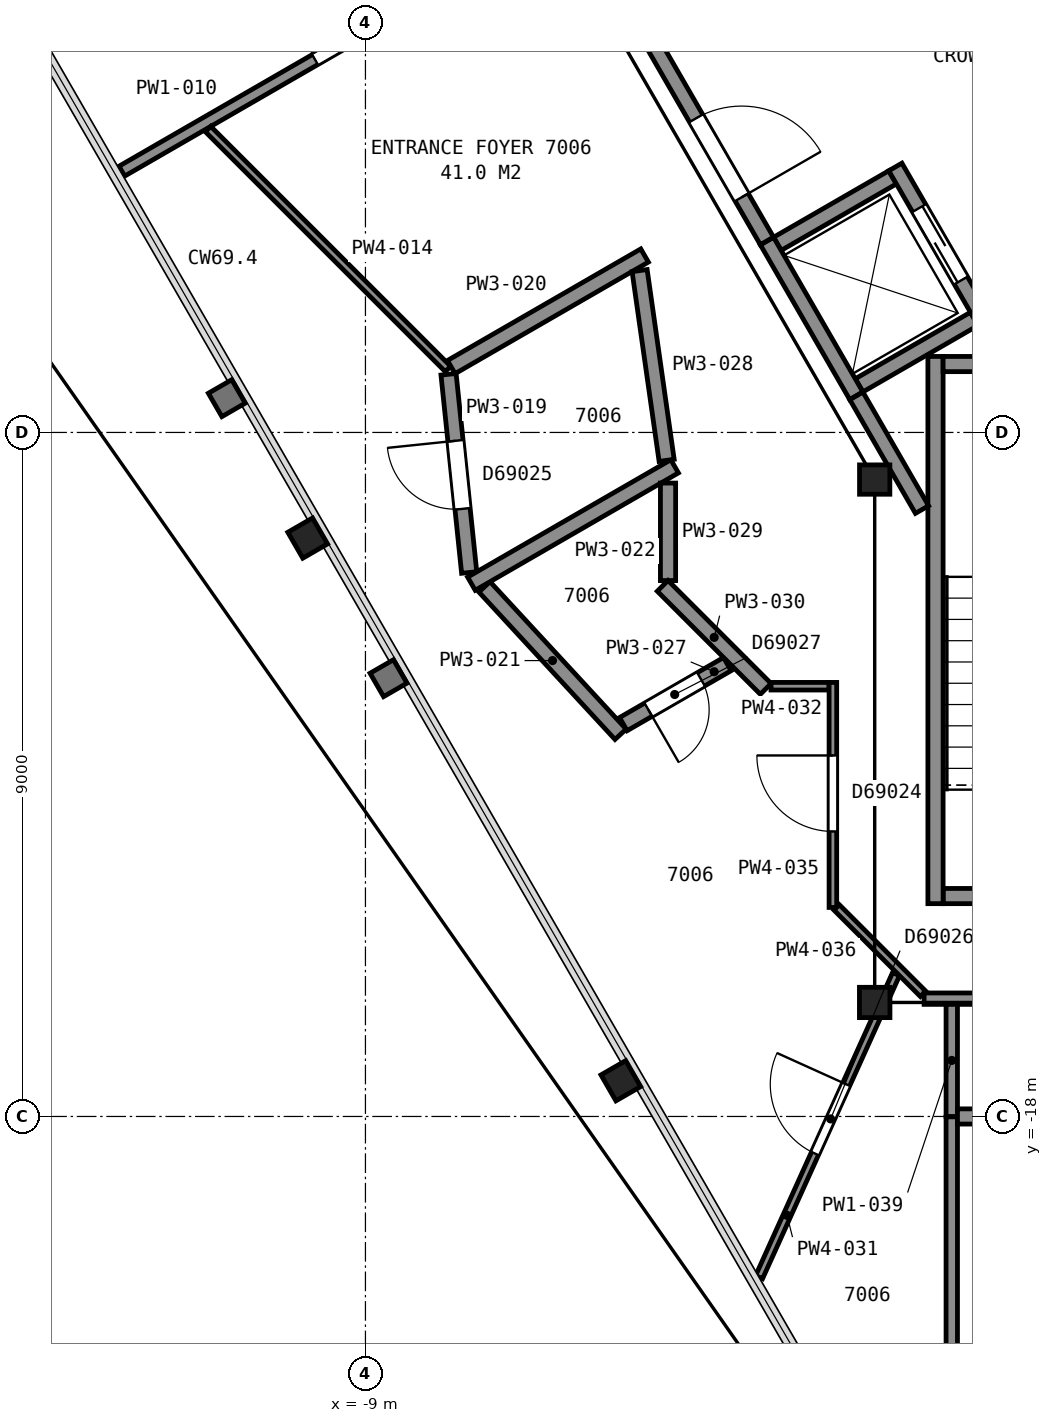
"""IFC4 building model, lengths in metres.
Left out: names, types, materials, properties, quantities, classifications, styles, units other than length and angle.
Written with IfcOpenShell. Run it as: python <this file> out.ifc"""

import sys

from ifc_helpers import new_model, si_unit, direction, frame, frame_2d, origin, origin_2d, place, context, subcontext, project, spatial, rectangle, i_section, extrude, element, fill, save


model = new_model("IFC4")
c1 = context("Model", 3, precision=1e-05, world=origin(), true_north=direction((0.0, 1.0)))
c2 = subcontext(c1, "Body", "Model", "MODEL_VIEW")
j1 = project(units=[si_unit("LENGTHUNIT", "METRE"), si_unit("PLANEANGLEUNIT", "RADIAN")], contexts=[c1])
p1 = place(None, origin())
s1 = spatial("IfcSite", under=j1, at=p1, CompositionType="ELEMENT")
p2 = place(p1, origin())
s2 = spatial("IfcBuilding", under=s1, at=p2, CompositionType="ELEMENT")
p3 = place(p2, frame((0.0, 0.0, 278.8)))
s3 = spatial("IfcBuildingStorey", under=s2, at=p3, CompositionType="ELEMENT", Elevation=278.8)
for number, where, z_axis, x_axis in (
    (1, (-9.76, -10.39, 0.0), (0.0, 0.0, 1.0), (-0.5, 0.866, 0.0)),
    (2, (-5.64, -17.53, 0.0), (0.0, 0.0, 1.0), (-0.5, 0.866, 0.0)),
):
    element("IfcColumn", number, at=place(p3, frame(where, z_axis=z_axis, x_axis=x_axis)), inside=s3, PredefinedType="COLUMN", context=c2, shape_type="SweptSolid", body=[
        extrude(i_section(OverallWidth=0.394, OverallDepth=0.376, WebThickness=0.017, FlangeThickness=0.028, FilletRadius=0.015, at=origin_2d()), origin(), (0.0, 0.0, 1.0), 3.7),
    ])
p4 = place(p3, frame((-2.3, -9.62, 0.0), z_axis=(0.0, 0.0, 1.0), x_axis=(1.0, 0.0, 0.0)))
e3 = element("IfcColumn", 3, at=p4, inside=s3, PredefinedType="COLUMN", context=c2, shape_type="SweptSolid", body=[
    extrude(i_section(OverallWidth=0.399, OverallDepth=0.386, WebThickness=0.021, FlangeThickness=0.033, FilletRadius=0.015, at=origin_2d()), origin(), (0.0, 0.0, 1.0), 3.7),
])
p5 = place(p3, frame((-2.3, -16.5, 0.0), z_axis=(0.0, 0.0, 1.0), x_axis=(-1.0, 0.0, 0.0)))
e4 = element("IfcColumn", 4, at=p5, inside=s3, PredefinedType="COLUMN", context=c2, shape_type="SweptSolid", body=[
    extrude(i_section(OverallWidth=0.401, OverallDepth=0.399, WebThickness=0.025, FlangeThickness=0.04, FilletRadius=0.015, at=origin_2d()), origin(), (0.0, 0.0, 1.0), 3.7),
])
p6 = place(p3, frame((-1.4, -15.1, 0.0), z_axis=(0.0, 0.0, 1.0), x_axis=(1.0, 0.0, 0.0)))
e5 = element("IfcWall", 5, at=p6, inside=s3, PredefinedType="PARTITIONING", context=c2, shape_type="SweptSolid", body=[
    extrude(rectangle(XDim=2.8, YDim=0.2, at=frame_2d((1.4, 0.0))), origin(), (0.0, 0.0, 1.0), 3.45),
])
p7 = place(p6, frame((0.85, 0.0, 0.0)))
e6 = element("IfcOpeningElement", 6, at=p7, cuts=e5, PredefinedType="OPENING", context=c2, shape_type="SweptSolid", body=[
    extrude(rectangle(XDim=1.1, YDim=2.1, at=frame_2d((0.55, 1.05))), frame((0.0, 0.11, 0.0), z_axis=(0.0, -1.0, 0.0), x_axis=(1.0, 0.0, 0.0)), (0.0, 0.0, 1.0), 0.22),
])
p8 = place(p3, frame((-1.5, -8.0, 0.0), z_axis=(0.0, 0.0, 1.0), x_axis=(0.0, -1.0, 0.0)))
e7 = element("IfcWall", 7, at=p8, inside=s3, PredefinedType="PARTITIONING", context=c2, shape_type="SweptSolid", body=[
    extrude(rectangle(XDim=7.2, YDim=0.2, at=frame_2d((3.6, 0.0))), origin(), (0.0, 0.0, 1.0), 3.45),
])
p9 = place(p3, frame((-1.4, -8.1, 0.0), z_axis=(0.0, 0.0, 1.0), x_axis=(1.0, 0.0, 0.0)))
e8 = element("IfcWall", 8, at=p9, inside=s3, PredefinedType="PARTITIONING", context=c2, shape_type="SweptSolid", body=[
    extrude(rectangle(XDim=2.8, YDim=0.2, at=frame_2d((1.4, 0.0))), origin(), (0.0, 0.0, 1.0), 3.45),
])
for number, where, z_axis, x_axis in (
    (9, (-2.505, -8.38, 0.0), (0.0, 0.0, 1.0), (0.866, 0.5, 0.0)),
    (10, (-3.58, -6.519, 0.0), (0.0, 0.0, 1.0), (0.866, 0.5, 0.0)),
):
    element("IfcWall", number, at=place(p3, frame(where, z_axis=z_axis, x_axis=x_axis)), inside=s3, PredefinedType="PARTITIONING", context=c2, shape_type="SweptSolid", body=[
        extrude(rectangle(XDim=1.75, YDim=0.2, at=frame_2d((0.875, 0.0))), origin(), (0.0, 0.0, 1.0), 3.7),
    ])
p10 = place(p3, frame((-0.853, -7.542, 0.0), z_axis=(0.0, 0.0, 1.0), x_axis=(-0.500016218704, 0.866016039709, 0.0)))
e11 = element("IfcWall", 11, at=p10, inside=s3, PredefinedType="PARTITIONING", context=c2, shape_type="SweptSolid", body=[
    extrude(rectangle(XDim=2.35, YDim=0.2, at=frame_2d((1.175, 0.0))), origin(), (0.0, 0.0, 1.0), 3.7),
])
p11 = place(p10, frame((0.625, 0.0, 0.0)))
e12 = element("IfcOpeningElement", 12, at=p11, cuts=e11, PredefinedType="OPENING", context=c2, shape_type="SweptSolid", body=[
    extrude(rectangle(XDim=1.1, YDim=2.1, at=frame_2d((0.55, 1.05))), frame((0.0, 0.11, 0.0), z_axis=(0.0, -1.0, 0.0), x_axis=(1.0, 0.0, 0.0)), (0.0, 0.0, 1.0), 0.22),
])
p12 = place(p3, frame((-2.542, -8.517, 0.0), z_axis=(0.0, 0.0, 1.0), x_axis=(-0.500016218704, 0.866016039709, 0.0)))
e13 = element("IfcWall", 13, at=p12, inside=s3, PredefinedType="PARTITIONING", context=c2, shape_type="SweptSolid", body=[
    extrude(rectangle(XDim=2.35, YDim=0.2, at=frame_2d((1.175, 0.0))), origin(), (0.0, 0.0, 1.0), 3.7),
])
p13 = place(p3, frame((-7.141, -0.551, 0.0), z_axis=(0.0, 0.0, 1.0), x_axis=(0.500001302854, -0.86602465158, 0.0)))
e14 = element("IfcWall", 14, at=p13, inside=s3, PredefinedType="PARTITIONING", context=c2, shape_type="SweptSolid", body=[
    extrude(rectangle(XDim=6.846, YDim=0.2, at=frame_2d((3.423, 0.0))), origin(), (0.0, 0.0, 1.0), 3.45),
])
p14 = place(p13, frame((4.983, 0.0, 0.0)))
e15 = element("IfcOpeningElement", 15, at=p14, cuts=e14, PredefinedType="OPENING", context=c2, shape_type="SweptSolid", body=[
    extrude(rectangle(XDim=1.2, YDim=2.1, at=frame_2d((0.6, 1.05))), frame((0.0, 0.11, 0.0), z_axis=(0.0, -1.0, 0.0), x_axis=(1.0, 0.0, 0.0)), (0.0, 0.0, 1.0), 0.22),
])
p15 = place(p3, frame((-2.541, -8.519, 0.0), z_axis=(0.0, 0.0, 1.0), x_axis=(0.500016142392, -0.86601608377, 0.0)))
e16 = element("IfcWall", 16, at=p15, inside=s3, PredefinedType="PARTITIONING", context=c2, shape_type="SweptSolid", body=[
    extrude(rectangle(XDim=1.727, YDim=0.2, at=frame_2d((0.864, 0.0))), origin(), (0.0, 0.0, 1.0), 3.45),
])
p16 = place(p3, frame((-12.205, -5.562, 0.0), z_axis=(0.0, 0.0, 1.0), x_axis=(0.866006351856, 0.500032997455, 0.0)))
e17 = element("IfcWall", 17, at=p16, inside=s3, PredefinedType="PARTITIONING", context=c2, shape_type="SweptSolid", body=[
    extrude(rectangle(XDim=5.671, YDim=0.15, at=frame_2d((2.835, 0.0))), origin(), (0.0, 0.0, 1.0), 2.723),
])
p17 = place(p16, frame((2.935, 0.0, 0.0)))
e18 = element("IfcOpeningElement", 18, at=p17, cuts=e17, PredefinedType="OPENING", context=c2, shape_type="SweptSolid", body=[
    extrude(rectangle(XDim=1.0, YDim=2.1, at=frame_2d((0.5, 1.05))), frame((0.0, 0.085, 0.0), z_axis=(0.0, -1.0, 0.0), x_axis=(1.0, 0.0, 0.0)), (0.0, 0.0, 1.0), 0.17),
])
p18 = place(p3, frame((-11.071, -5.008, 0.0), z_axis=(0.0, 0.0, 1.0), x_axis=(0.707079435951, -0.707134125365, 0.0)))
e19 = element("IfcWall", 19, at=p18, inside=s3, PredefinedType="PARTITIONING", context=c2, shape_type="SweptSolid", body=[
    extrude(rectangle(XDim=4.464, YDim=0.1, at=frame_2d((2.232, 0.0))), origin(), (0.0, 0.0, 1.0), 2.723),
])
p19 = place(p3, frame((-7.907, -8.235, 0.0), z_axis=(0.0, 0.0, 1.0), x_axis=(0.103623353624, -0.994616609847, 0.0)))
e20 = element("IfcWall", 20, at=p19, inside=s3, PredefinedType="PARTITIONING", context=c2, shape_type="SweptSolid", body=[
    extrude(rectangle(XDim=2.622, YDim=0.2, at=frame_2d((1.311, 0.0))), origin(), (0.0, 0.0, 1.0), 2.723),
])
p20 = place(p19, frame((0.88, 0.0, 0.0)))
e21 = element("IfcOpeningElement", 21, at=p20, cuts=e20, PredefinedType="OPENING", context=c2, shape_type="SweptSolid", body=[
    extrude(rectangle(XDim=0.9, YDim=2.1, at=frame_2d((0.45, 1.05))), frame((0.0, 0.11, 0.0), z_axis=(0.0, -1.0, 0.0), x_axis=(1.0, 0.0, 0.0)), (0.0, 0.0, 1.0), 0.22),
])
p21 = place(p3, frame((-7.871, -8.14, 0.0), z_axis=(0.0, 0.0, 1.0), x_axis=(0.866106676517, 0.49985920507, 0.0)))
e22 = element("IfcWall", 22, at=p21, inside=s3, PredefinedType="PARTITIONING", context=c2, shape_type="SweptSolid", body=[
    extrude(rectangle(XDim=2.936, YDim=0.2, at=frame_2d((1.468, 0.0))), origin(), (0.0, 0.0, 1.0), 2.723),
])
p22 = place(p3, frame((-7.434, -11.032, 0.0), z_axis=(0.0, 0.0, 1.0), x_axis=(0.678387636859, -0.734704167782, 0.0)))
e23 = element("IfcWall", 23, at=p22, inside=s3, PredefinedType="PARTITIONING", context=c2, shape_type="SweptSolid", body=[
    extrude(rectangle(XDim=2.64, YDim=0.2, at=frame_2d((1.32, 0.0))), origin(), (0.0, 0.0, 1.0), 2.723),
])
p23 = place(p3, frame((-7.606, -10.99, 0.0), z_axis=(0.0, 0.0, 1.0), x_axis=(0.865956409518, 0.500119482538, 0.0)))
e24 = element("IfcWall", 24, at=p23, inside=s3, PredefinedType="PARTITIONING", context=c2, shape_type="SweptSolid", body=[
    extrude(rectangle(XDim=3.087, YDim=0.2, at=frame_2d((1.543, 0.0))), origin(), (0.0, 0.0, 1.0), 2.723),
])
p24 = place(p3, frame((-5.607, -12.838, 0.0), z_axis=(0.0, 0.0, 1.0), x_axis=(0.866095534226, 0.499878510834, 0.0)))
e25 = element("IfcWall", 25, at=p24, inside=s3, PredefinedType="PARTITIONING", context=c2, shape_type="SweptSolid", body=[
    extrude(rectangle(XDim=1.58, YDim=0.2, at=frame_2d((0.79, 0.0))), origin(), (0.0, 0.0, 1.0), 2.723),
])
p25 = place(p24, frame((0.38, 0.0, 0.0)))
e26 = element("IfcOpeningElement", 26, at=p25, cuts=e25, PredefinedType="OPENING", context=c2, shape_type="SweptSolid", body=[
    extrude(rectangle(XDim=0.8, YDim=2.1, at=frame_2d((0.4, 1.05))), frame((0.0, 0.11, 0.0), z_axis=(0.0, -1.0, 0.0), x_axis=(1.0, 0.0, 0.0)), (0.0, 0.0, 1.0), 0.22),
])
p26 = place(p3, frame((-5.393, -6.871, 0.0), z_axis=(0.0, 0.0, 1.0), x_axis=(0.140960508483, -0.990015219604, 0.0)))
e27 = element("IfcWall", 27, at=p26, inside=s3, PredefinedType="PARTITIONING", context=c2, shape_type="SweptSolid", body=[
    extrude(rectangle(XDim=2.522, YDim=0.2, at=frame_2d((1.261, 0.0))), origin(), (0.0, 0.0, 1.0), 2.723),
])
p27 = place(p3, frame((-5.019, -10.949, 0.0), z_axis=(0.0, 0.0, 1.0), x_axis=(0.0, 1.0, 0.0)))
e28 = element("IfcWall", 28, at=p27, inside=s3, PredefinedType="PARTITIONING", context=c2, shape_type="SweptSolid", body=[
    extrude(rectangle(XDim=1.283, YDim=0.2, at=frame_2d((0.642, 0.0))), origin(), (0.0, 0.0, 1.0), 2.723),
])
p28 = place(p3, frame((-5.09, -11.018, 0.0), z_axis=(0.0, 0.0, 1.0), x_axis=(0.707106781187, -0.707106781187, 0.0)))
e29 = element("IfcWall", 29, at=p28, inside=s3, PredefinedType="PARTITIONING", context=c2, shape_type="SweptSolid", body=[
    extrude(rectangle(XDim=1.918, YDim=0.2, at=frame_2d((0.959, 0.0))), origin(), (0.0, 0.0, 1.0), 2.723),
])
p29 = place(p3, frame((-2.019, -16.127, 0.0), z_axis=(0.0, 0.0, 1.0), x_axis=(-0.411876718461, -0.911239578151, 0.0)))
e30 = element("IfcWall", 30, at=p29, inside=s3, PredefinedType="PARTITIONING", context=c2, shape_type="SweptSolid", body=[
    extrude(rectangle(XDim=4.376, YDim=0.1, at=frame_2d((2.188, 0.0))), origin(), (0.0, 0.0, 1.0), 2.723),
])
p30 = place(p29, frame((1.591, 0.0, 0.0)))
e31 = element("IfcOpeningElement", 31, at=p30, cuts=e30, PredefinedType="OPENING", context=c2, shape_type="SweptSolid", body=[
    extrude(rectangle(XDim=1.0, YDim=2.1, at=frame_2d((0.5, 1.05))), frame((0.0, 0.06, 0.0), z_axis=(0.0, -1.0, 0.0), x_axis=(1.0, 0.0, 0.0)), (0.0, 0.0, 1.0), 0.12),
])
p31 = place(p3, frame((-3.664, -12.339, 0.0), z_axis=(0.0, 0.0, 1.0), x_axis=(1.0, 0.0, 0.0)))
e32 = element("IfcWall", 32, at=p31, inside=s3, PredefinedType="PARTITIONING", context=c2, shape_type="SweptSolid", body=[
    extrude(rectangle(XDim=0.764, YDim=0.1, at=frame_2d((0.382, 0.0))), origin(), (0.0, 0.0, 1.0), 2.723),
])
p32 = place(p3, frame((-2.85, -15.25, 0.0), z_axis=(0.0, 0.0, 1.0), x_axis=(0.0, 1.0, 0.0)))
e33 = element("IfcWall", 33, at=p32, inside=s3, PredefinedType="PARTITIONING", context=c2, shape_type="SweptSolid", body=[
    extrude(rectangle(XDim=2.961, YDim=0.1, at=frame_2d((1.48, 0.0))), origin(), (0.0, 0.0, 1.0), 2.723),
])
p33 = place(p32, frame((1.0, 0.0, 0.0)))
e34 = element("IfcOpeningElement", 34, at=p33, cuts=e33, PredefinedType="OPENING", context=c2, shape_type="SweptSolid", body=[
    extrude(rectangle(XDim=1.0, YDim=2.1, at=frame_2d((0.5, 1.05))), frame((0.0, 0.06, 0.0), z_axis=(0.0, -1.0, 0.0), x_axis=(1.0, 0.0, 0.0)), (0.0, 0.0, 1.0), 0.12),
])
p34 = place(p3, frame((-2.801, -15.25, 0.0), z_axis=(0.0, 0.0, 1.0), x_axis=(0.707106781187, -0.707106781187, 0.0)))
e35 = element("IfcWall", 35, at=p34, inside=s3, PredefinedType="PARTITIONING", context=c2, shape_type="SweptSolid", body=[
    extrude(rectangle(XDim=1.608, YDim=0.1, at=frame_2d((0.804, 0.0))), origin(), (0.0, 0.0, 1.0), 2.723),
])
p35 = place(p3, frame((-1.65, -16.45, 0.0), z_axis=(0.0, 0.0, 1.0), x_axis=(1.0, 0.0, 0.0)))
e36 = element("IfcWall", 36, at=p35, inside=s3, PredefinedType="PARTITIONING", context=c2, shape_type="SweptSolid", body=[
    extrude(rectangle(XDim=2.625, YDim=0.15, at=frame_2d((1.312, 0.0))), origin(), (0.0, 0.0, 1.0), 2.723),
])
p36 = place(p3, frame((-1.286, -24.421, 0.0), z_axis=(0.0, 0.0, 1.0), x_axis=(0.0, 1.0, 0.0)))
e37 = element("IfcWall", 37, at=p36, inside=s3, PredefinedType="PARTITIONING", context=c2, shape_type="SweptSolid", body=[
    extrude(rectangle(XDim=6.416, YDim=0.15, at=frame_2d((3.208, 0.0))), origin(), (0.0, 0.0, 1.0), 2.723),
])
p37 = place(p3, frame((-1.286, -18.0, 0.0), z_axis=(0.0, 0.0, 1.0), x_axis=(0.0, 1.0, 0.0)))
e38 = element("IfcWall", 38, at=p37, inside=s3, PredefinedType="PARTITIONING", context=c2, shape_type="SweptSolid", body=[
    extrude(rectangle(XDim=1.475, YDim=0.15, at=frame_2d((0.738, 0.0))), origin(), (0.0, 0.0, 1.0), 2.723),
])
p38 = place(p3, frame((-1.211, -18.0, 0.0), z_axis=(0.0, 0.0, 1.0), x_axis=(1.0, 0.0, 0.0)))
e39 = element("IfcWall", 39, at=p38, inside=s3, PredefinedType="PARTITIONING", context=c2, shape_type="SweptSolid", body=[
    extrude(rectangle(XDim=2.511, YDim=0.2, at=frame_2d((1.255, 0.0))), origin(), (0.0, 0.0, 1.0), 2.723),
])
p39 = place(p38, frame((0.875, 0.0, 0.0)))
e40 = element("IfcOpeningElement", 40, at=p39, cuts=e39, PredefinedType="OPENING", context=c2, shape_type="SweptSolid", body=[
    extrude(rectangle(XDim=0.8, YDim=2.1, at=frame_2d((0.4, 1.05))), frame((0.0, 0.11, 0.0), z_axis=(0.0, -1.0, 0.0), x_axis=(1.0, 0.0, 0.0)), (0.0, 0.0, 1.0), 0.22),
])
p40 = place(p11, origin())
e41 = element("IfcDoor", 41, at=p40, inside=s3, OperationType="SLIDING_TO_LEFT", PredefinedType="DOOR", context=c2, shape_type="SweptSolid", body=[
    extrude(rectangle(XDim=1.1, YDim=2.1, at=frame_2d((0.55, 1.05))), frame((0.0, 0.025, 0.0), z_axis=(0.0, -1.0, 0.0), x_axis=(1.0, 0.0, 0.0)), (0.0, 0.0, 1.0), 0.05),
])
fill(e12, e41)
p41 = place(p14, origin())
e42 = element("IfcDoor", 42, at=p41, inside=s3, OperationType="SINGLE_SWING_RIGHT", PredefinedType="DOOR", context=c2, shape_type="SweptSolid", body=[
    extrude(rectangle(XDim=1.2, YDim=2.1, at=frame_2d((0.6, 1.05))), frame((0.0, 0.025, 0.0), z_axis=(0.0, -1.0, 0.0), x_axis=(1.0, 0.0, 0.0)), (0.0, 0.0, 1.0), 0.05),
])
fill(e15, e42)
p42 = place(p17, origin())
e43 = element("IfcDoor", 43, at=p42, inside=s3, OperationType="SINGLE_SWING_RIGHT", PredefinedType="DOOR", context=c2, shape_type="SweptSolid", body=[
    extrude(rectangle(XDim=1.0, YDim=2.1, at=frame_2d((0.5, 1.05))), frame((0.0, 0.025, 0.0), z_axis=(0.0, -1.0, 0.0), x_axis=(1.0, 0.0, 0.0)), (0.0, 0.0, 1.0), 0.05),
])
fill(e18, e43)
p43 = place(p20, origin())
e44 = element("IfcDoor", 44, at=p43, inside=s3, OperationType="SINGLE_SWING_LEFT", PredefinedType="DOOR", context=c2, shape_type="SweptSolid", body=[
    extrude(rectangle(XDim=0.9, YDim=2.1, at=frame_2d((0.45, 1.05))), frame((0.0, 0.025, 0.0), z_axis=(0.0, -1.0, 0.0), x_axis=(1.0, 0.0, 0.0)), (0.0, 0.0, 1.0), 0.05),
])
fill(e21, e44)
p44 = place(p25, origin())
e45 = element("IfcDoor", 45, at=p44, inside=s3, OperationType="SINGLE_SWING_LEFT", PredefinedType="DOOR", context=c2, shape_type="SweptSolid", body=[
    extrude(rectangle(XDim=0.8, YDim=2.1, at=frame_2d((0.4, 1.05))), frame((0.0, 0.025, 0.0), z_axis=(0.0, -1.0, 0.0), x_axis=(1.0, 0.0, 0.0)), (0.0, 0.0, 1.0), 0.05),
])
fill(e26, e45)
p45 = place(p30, origin())
e46 = element("IfcDoor", 46, at=p45, inside=s3, OperationType="SINGLE_SWING_LEFT", PredefinedType="DOOR", context=c2, shape_type="SweptSolid", body=[
    extrude(rectangle(XDim=1.0, YDim=2.1, at=frame_2d((0.5, 1.05))), frame((0.0, 0.025, 0.0), z_axis=(0.0, -1.0, 0.0), x_axis=(1.0, 0.0, 0.0)), (0.0, 0.0, 1.0), 0.05),
])
fill(e31, e46)
p46 = place(p33, origin())
e47 = element("IfcDoor", 47, at=p46, inside=s3, OperationType="SINGLE_SWING_RIGHT", PredefinedType="DOOR", context=c2, shape_type="SweptSolid", body=[
    extrude(rectangle(XDim=1.0, YDim=2.1, at=frame_2d((0.5, 1.05))), frame((0.0, 0.025, 0.0), z_axis=(0.0, -1.0, 0.0), x_axis=(1.0, 0.0, 0.0)), (0.0, 0.0, 1.0), 0.05),
])
fill(e34, e47)
save(model, sys.argv[1])
